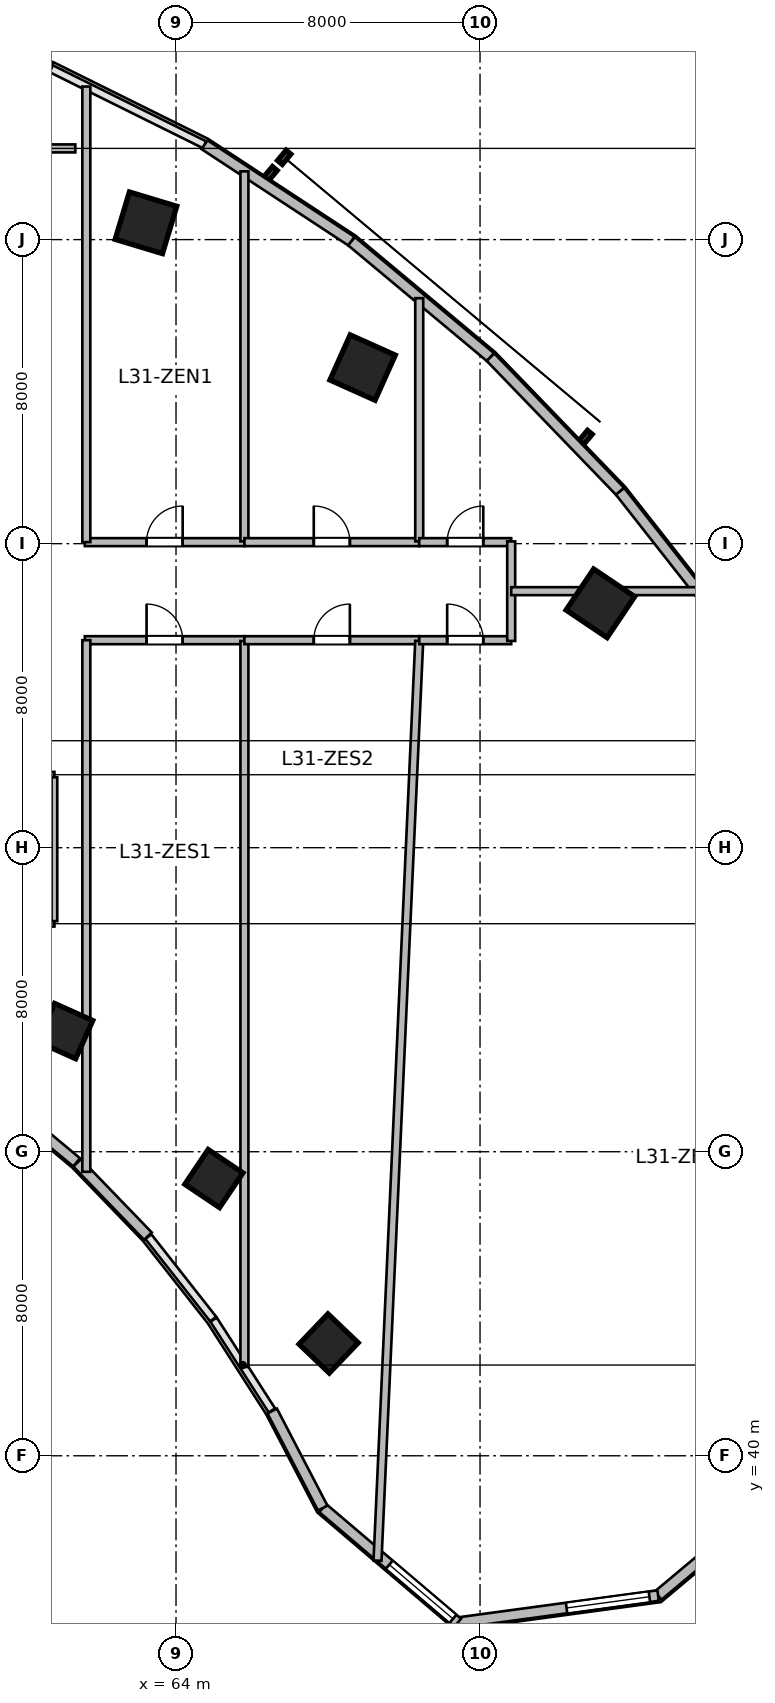
"""IFC4 building model, lengths in metres.
Left out: names, types, materials, properties, quantities, classifications, styles, units other than length and angle.
Written with IfcOpenShell. Run it as: python <this file> out.ifc"""

import sys

from ifc_helpers import new_model, si_unit, direction, frame, frame_2d, origin, origin_2d, place, context, subcontext, project, spatial, rectangle, extrude, source, transform, mapped, element, fill, save


model = new_model("IFC4")
c1 = context("Model", 3, precision=1e-05, world=origin(), true_north=direction((0.0, 1.0)))
c2 = subcontext(c1, "Body", "Model", "MODEL_VIEW")
j1 = project(units=[si_unit("LENGTHUNIT", "METRE"), si_unit("PLANEANGLEUNIT", "RADIAN")], contexts=[c1])
p1 = place(None, origin())
s1 = spatial("IfcSite", under=j1, at=p1, CompositionType="ELEMENT")
p2 = place(p1, origin())
s2 = spatial("IfcBuilding", under=s1, at=p2, CompositionType="ELEMENT")
p3 = place(p2, frame((0.0, 0.0, 131.1)))
s3 = spatial("IfcBuildingStorey", under=s2, at=p3, CompositionType="ELEMENT", Elevation=131.1)
m1 = source(origin(), c2, "Body", "SweptSolid", [
    extrude(rectangle(XDim=1.3, YDim=1.3, at=origin_2d()), origin(), (0.0, 0.0, 1.0), 3.9),
])
p4 = place(p3, frame((63.209, 72.442, 0.0), z_axis=(0.0, 0.0, 1.0), x_axis=(0.288697611798, 0.957420330337, 0.0)))
e1 = element("IfcColumn", 1, at=p4, inside=s3, PredefinedType="COLUMN", context=c2, shape_type="MappedRepresentation", body=[
    mapped(m1, transform((0.0, 0.0, 0.0), scale=1.0)),
])
m2 = source(origin(), c2, "Body", "SweptSolid", [
    extrude(rectangle(XDim=1.1, YDim=1.1, at=origin_2d()), origin(), (0.0, 0.0, 1.0), 3.9),
])
p5 = place(p3, frame((61.082, 51.175, 0.0), z_axis=(0.0, 0.0, 1.0), x_axis=(0.409126902895, 0.912477494148, 0.0)))
e2 = element("IfcColumn", 2, at=p5, inside=s3, PredefinedType="COLUMN", context=c2, shape_type="MappedRepresentation", body=[
    mapped(m2, transform((0.0, 0.0, 0.0), scale=1.0)),
])
p6 = place(p3, frame((68.91, 68.633, 0.0), z_axis=(0.0, 0.0, 1.0), x_axis=(0.409126902895, 0.912477494148, 0.0)))
e3 = element("IfcColumn", 3, at=p6, inside=s3, PredefinedType="COLUMN", context=c2, shape_type="MappedRepresentation", body=[
    mapped(m1, transform((0.0, 0.0, 0.0), scale=1.0)),
])
p7 = place(p3, frame((64.996, 47.294, 0.0), z_axis=(0.0, 0.0, 1.0), x_axis=(0.55774510898, 0.830012285095, 0.0)))
e4 = element("IfcColumn", 4, at=p7, inside=s3, PredefinedType="COLUMN", context=c2, shape_type="MappedRepresentation", body=[
    mapped(m2, transform((0.0, 0.0, 0.0), scale=1.0)),
])
p8 = place(p3, frame((75.167, 62.43, 0.0), z_axis=(0.0, 0.0, 1.0), x_axis=(0.55774510898, 0.830012285095, 0.0)))
e5 = element("IfcColumn", 5, at=p8, inside=s3, PredefinedType="COLUMN", context=c2, shape_type="MappedRepresentation", body=[
    mapped(m1, transform((0.0, 0.0, 0.0), scale=1.0)),
])
p9 = place(p3, frame((68.015, 42.955, 0.0), z_axis=(0.0, 0.0, 1.0), x_axis=(0.690756218984, 0.723087716626, 0.0)))
e6 = element("IfcColumn", 6, at=p9, inside=s3, PredefinedType="COLUMN", context=c2, shape_type="MappedRepresentation", body=[
    mapped(m2, transform((0.0, 0.0, 0.0), scale=1.0)),
])
m3 = source(origin(), c2, "Body", "SweptSolid", [
    extrude(rectangle(XDim=6.573, YDim=0.28, at=frame_2d((3.287, 0.0))), origin(), (0.0, 0.0, 1.0), 3.65),
])
p10 = place(p3, frame((81.725, 40.541, 0.0), z_axis=(0.0, 0.0, 1.0), x_axis=(-0.766715154163, -0.641987439423, 0.0)))
e7 = element("IfcWall", 7, at=p10, inside=s3, PredefinedType="SOLIDWALL", context=c2, shape_type="MappedRepresentation", body=[
    mapped(m3, transform((0.0, 0.0, 0.0), scale=1.0)),
])
p11 = place(p10, frame((0.543, 0.0, 0.95)))
e8 = element("IfcOpeningElement", 8, at=p11, cuts=e7, PredefinedType="OPENING", context=c2, shape_type="SweptSolid", body=[
    extrude(rectangle(XDim=2.2, YDim=2.1, at=frame_2d((1.1, 1.05))), frame((0.0, 0.15, 0.0), z_axis=(0.0, -1.0, 0.0), x_axis=(1.0, 0.0, 0.0)), (0.0, 0.0, 1.0), 0.3),
])
m4 = source(origin(), c2, "Body", "SweptSolid", [
    extrude(rectangle(XDim=5.324, YDim=0.28, at=frame_2d((2.662, 0.0))), origin(), (0.0, 0.0, 1.0), 3.65),
])
p12 = place(p3, frame((76.686, 36.322, 0.0), z_axis=(0.0, 0.0, 1.0), x_axis=(-0.990931467223, -0.134368252451, 0.0)))
e9 = element("IfcWall", 9, at=p12, inside=s3, PredefinedType="SOLIDWALL", context=c2, shape_type="MappedRepresentation", body=[
    mapped(m4, transform((0.0, 0.0, 0.0), scale=1.0)),
])
p13 = place(p12, frame((0.231, 0.0, 0.95)))
e10 = element("IfcOpeningElement", 10, at=p13, cuts=e9, PredefinedType="OPENING", context=c2, shape_type="SweptSolid", body=[
    extrude(rectangle(XDim=2.2, YDim=2.1, at=frame_2d((1.1, 1.05))), frame((0.0, 0.15, 0.0), z_axis=(0.0, -1.0, 0.0), x_axis=(1.0, 0.0, 0.0)), (0.0, 0.0, 1.0), 0.3),
])
m5 = source(origin(), c2, "Body", "SweptSolid", [
    extrude(rectangle(XDim=4.659, YDim=0.28, at=frame_2d((2.33, 0.0))), origin(), (0.0, 0.0, 1.0), 3.65),
])
p14 = place(p3, frame((71.41, 35.606, 0.0), z_axis=(0.0, 0.0, 1.0), x_axis=(-0.761913458795, 0.647678841176, 0.0)))
e11 = element("IfcWall", 11, at=p14, inside=s3, PredefinedType="SOLIDWALL", context=c2, shape_type="MappedRepresentation", body=[
    mapped(m5, transform((0.0, 0.0, 0.0), scale=1.0)),
])
p15 = place(p14, frame((0.16, 0.0, 0.95)))
e12 = element("IfcOpeningElement", 12, at=p15, cuts=e11, PredefinedType="OPENING", context=c2, shape_type="SweptSolid", body=[
    extrude(rectangle(XDim=2.2, YDim=2.1, at=frame_2d((1.1, 1.05))), frame((0.0, 0.15, 0.0), z_axis=(0.0, -1.0, 0.0), x_axis=(1.0, 0.0, 0.0)), (0.0, 0.0, 1.0), 0.3),
])
m6 = source(origin(), c2, "Body", "SweptSolid", [
    extrude(rectangle(XDim=2.88, YDim=0.28, at=frame_2d((1.44, 0.0))), origin(), (0.0, 0.0, 1.0), 3.65),
])
p16 = place(p3, frame((67.861, 38.624, 0.0), z_axis=(0.0, 0.0, 1.0), x_axis=(-0.461769086658, 0.887000175088, 0.0)))
e13 = element("IfcWall", 13, at=p16, inside=s3, PredefinedType="SOLIDWALL", context=c2, shape_type="MappedRepresentation", body=[
    mapped(m6, transform((0.0, 0.0, 0.0), scale=1.0)),
])
m7 = source(origin(), c2, "Body", "SweptSolid", [
    extrude(rectangle(XDim=2.68, YDim=0.28, at=frame_2d((1.34, 0.0))), origin(), (0.0, 0.0, 1.0), 3.65),
])
p17 = place(p3, frame((63.26, 45.78, 0.0), z_axis=(0.0, 0.0, 1.0), x_axis=(-0.694561996568, 0.719432855049, 0.0)))
e14 = element("IfcWall", 14, at=p17, inside=s3, PredefinedType="SOLIDWALL", context=c2, shape_type="MappedRepresentation", body=[
    mapped(m7, transform((0.0, 0.0, 0.0), scale=1.0)),
])
m8 = source(origin(), c2, "Body", "SweptSolid", [
    extrude(rectangle(XDim=2.601, YDim=0.28, at=frame_2d((1.3, 0.0))), origin(), (0.0, 0.0, 1.0), 3.65),
])
p18 = place(p3, frame((61.385, 47.721, 0.0), z_axis=(0.0, 0.0, 1.0), x_axis=(-0.76796730295, 0.640489048775, 0.0)))
e15 = element("IfcWall", 15, at=p18, inside=s3, PredefinedType="SOLIDWALL", context=c2, shape_type="MappedRepresentation", body=[
    mapped(m8, transform((0.0, 0.0, 0.0), scale=1.0)),
])
m9 = source(origin(), c2, "Body", "SweptSolid", [
    extrude(rectangle(XDim=4.409, YDim=0.28, at=frame_2d((2.205, 0.0))), origin(), (0.0, 0.0, 1.0), 3.65),
])
p19 = place(p3, frame((56.548, 77.941, 0.0), z_axis=(0.0, 0.0, 1.0), x_axis=(0.944879374121, -0.327418643881, 0.0)))
e16 = element("IfcWall", 16, at=p19, inside=s3, PredefinedType="SOLIDWALL", context=c2, shape_type="MappedRepresentation", body=[
    mapped(m9, transform((0.0, 0.0, 0.0), scale=1.0)),
])
m10 = source(origin(), c2, "Body", "SweptSolid", [
    extrude(rectangle(XDim=4.626, YDim=0.28, at=frame_2d((2.313, 0.0))), origin(), (0.0, 0.0, 1.0), 3.65),
])
p20 = place(p3, frame((64.751, 74.496, 0.0), z_axis=(0.0, 0.0, 1.0), x_axis=(0.83595938331, -0.548791316855, 0.0)))
e17 = element("IfcWall", 17, at=p20, inside=s3, PredefinedType="SOLIDWALL", context=c2, shape_type="MappedRepresentation", body=[
    mapped(m10, transform((0.0, 0.0, 0.0), scale=1.0)),
])
m11 = source(origin(), c2, "Body", "SweptSolid", [
    extrude(rectangle(XDim=4.762, YDim=0.28, at=frame_2d((2.381, 0.0))), origin(), (0.0, 0.0, 1.0), 3.65),
])
p21 = place(p3, frame((68.618, 71.958, 0.0), z_axis=(0.0, 0.0, 1.0), x_axis=(0.767952279762, -0.640507061638, 0.0)))
e18 = element("IfcWall", 18, at=p21, inside=s3, PredefinedType="SOLIDWALL", context=c2, shape_type="MappedRepresentation", body=[
    mapped(m11, transform((0.0, 0.0, 0.0), scale=1.0)),
])
m12 = source(origin(), c2, "Body", "SweptSolid", [
    extrude(rectangle(XDim=4.908, YDim=0.28, at=frame_2d((2.454, 0.0))), origin(), (0.0, 0.0, 1.0), 3.65),
])
p22 = place(p3, frame((72.275, 68.907, 0.0), z_axis=(0.0, 0.0, 1.0), x_axis=(0.694613154328, -0.719383462302, 0.0)))
e19 = element("IfcWall", 19, at=p22, inside=s3, PredefinedType="SOLIDWALL", context=c2, shape_type="MappedRepresentation", body=[
    mapped(m12, transform((0.0, 0.0, 0.0), scale=1.0)),
])
m13 = source(origin(), c2, "Body", "SweptSolid", [
    extrude(rectangle(XDim=5.058, YDim=0.28, at=frame_2d((2.529, 0.0))), origin(), (0.0, 0.0, 1.0), 3.65),
])
p23 = place(p3, frame((75.685, 65.376, 0.0), z_axis=(0.0, 0.0, 1.0), x_axis=(0.618145507434, -0.786063694391, 0.0)))
e20 = element("IfcWall", 20, at=p23, inside=s3, PredefinedType="SOLIDWALL", context=c2, shape_type="MappedRepresentation", body=[
    mapped(m13, transform((0.0, 0.0, 0.0), scale=1.0)),
])
m14 = source(origin(), c2, "Body", "SweptSolid", [
    extrude(rectangle(XDim=6.6, YDim=0.15, at=frame_2d((3.3, 0.0))), origin(), (0.0, 0.0, 1.0), 3.095),
])
p24 = place(p3, frame((54.2, 54.0, 0.0), z_axis=(0.0, 0.0, 1.0), x_axis=(1.0, 0.0, 0.0)))
e21 = element("IfcWall", 21, at=p24, inside=s3, PredefinedType="PARTITIONING", context=c2, shape_type="MappedRepresentation", body=[
    mapped(m14, transform((0.0, 0.0, 0.0), scale=1.0)),
])
m15 = source(origin(), c2, "Body", "SweptSolid", [
    extrude(rectangle(XDim=6.6, YDim=0.15, at=frame_2d((3.3, 0.0))), origin(), (0.0, 0.0, 1.0), 3.65),
])
p25 = place(p3, frame((54.2, 57.92, 0.0), z_axis=(0.0, 0.0, 1.0), x_axis=(1.0, 0.0, 0.0)))
e22 = element("IfcWall", 22, at=p25, inside=s3, PredefinedType="PARTITIONING", context=c2, shape_type="MappedRepresentation", body=[
    mapped(m15, transform((0.0, 0.0, 0.0), scale=1.0)),
])
p26 = place(p25, frame((2.825, 0.0, 0.0)))
e23 = element("IfcOpeningElement", 23, at=p26, cuts=e22, PredefinedType="OPENING", context=c2, shape_type="SweptSolid", body=[
    extrude(rectangle(XDim=0.95, YDim=2.1, at=frame_2d((0.475, 1.05))), frame((0.0, 0.085, 0.0), z_axis=(0.0, -1.0, 0.0), x_axis=(1.0, 0.0, 0.0)), (0.0, 0.0, 1.0), 0.17),
])
m16 = source(origin(), c2, "Body", "SweptSolid", [
    extrude(rectangle(XDim=3.785, YDim=0.15, at=frame_2d((1.893, 0.0))), origin(), (0.0, 0.0, 1.0), 3.65),
])
p27 = place(p3, frame((60.8, 54.067, 0.0), z_axis=(0.0, 0.0, 1.0), x_axis=(0.0, 1.0, 0.0)))
e24 = element("IfcWall", 24, at=p27, inside=s3, PredefinedType="PARTITIONING", context=c2, shape_type="MappedRepresentation", body=[
    mapped(m16, transform((0.0, 0.0, 0.0), scale=1.0)),
])
m17 = source(origin(), c2, "Body", "SweptSolid", [
    extrude(rectangle(XDim=26.7, YDim=0.21, at=frame_2d((13.35, 0.0))), origin(), (0.0, 0.0, 1.0), 3.022),
])
p28 = place(p3, frame((34.65, 74.4, 0.0), z_axis=(0.0, 0.0, 1.0), x_axis=(1.0, 0.0, 0.0)))
e25 = element("IfcWall", 25, at=p28, inside=s3, PredefinedType="PARTITIONING", context=c2, shape_type="MappedRepresentation", body=[
    mapped(m17, transform((0.0, 0.0, 0.0), scale=1.0)),
])
p29 = place(p28, frame((12.8, 0.0, 0.0)))
e26 = element("IfcOpeningElement", 26, at=p29, cuts=e25, PredefinedType="OPENING", context=c2, shape_type="SweptSolid", body=[
    extrude(rectangle(XDim=1.1, YDim=2.15, at=frame_2d((0.55, 1.075))), frame((0.0, 0.115, 0.0), z_axis=(0.0, -1.0, 0.0), x_axis=(1.0, 0.0, 0.0)), (0.0, 0.0, 1.0), 0.23),
])
m18 = source(origin(), c2, "Body", "SweptSolid", [
    extrude(rectangle(XDim=4.2, YDim=0.21, at=frame_2d((2.1, 0.0))), origin(), (0.0, 0.0, 1.0), 3.65),
])
p30 = place(p3, frame((61.6, 64.04, 0.0), z_axis=(0.0, 0.0, 1.0), x_axis=(1.0, 0.0, 0.0)))
e27 = element("IfcWall", 27, at=p30, inside=s3, PredefinedType="PARTITIONING", context=c2, shape_type="MappedRepresentation", body=[
    mapped(m18, transform((0.0, 0.0, 0.0), scale=1.0)),
])
p31 = place(p30, frame((1.625, 0.0, 0.0)))
e28 = element("IfcOpeningElement", 28, at=p31, cuts=e27, PredefinedType="OPENING", context=c2, shape_type="SweptSolid", body=[
    extrude(rectangle(XDim=0.95, YDim=2.1, at=frame_2d((0.475, 1.05))), frame((0.0, 0.115, 0.0), z_axis=(0.0, -1.0, 0.0), x_axis=(1.0, 0.0, 0.0)), (0.0, 0.0, 1.0), 0.23),
])
m19 = source(origin(), c2, "Body", "SweptSolid", [
    extrude(rectangle(XDim=9.736, YDim=0.21, at=frame_2d((4.868, 0.0))), origin(), (0.0, 0.0, 1.0), 3.65),
])
p32 = place(p3, frame((65.8, 64.06, 0.0), z_axis=(0.0, 0.0, 1.0), x_axis=(0.0, 1.0, 0.0)))
e29 = element("IfcWall", 29, at=p32, inside=s3, PredefinedType="PARTITIONING", context=c2, shape_type="MappedRepresentation", body=[
    mapped(m19, transform((0.0, 0.0, 0.0), scale=1.0)),
])
m20 = source(origin(), c2, "Body", "SweptSolid", [
    extrude(rectangle(XDim=4.6, YDim=0.21, at=frame_2d((2.3, 0.0))), origin(), (0.0, 0.0, 1.0), 3.65),
])
p33 = place(p3, frame((65.8, 64.04, 0.0), z_axis=(0.0, 0.0, 1.0), x_axis=(1.0, 0.0, 0.0)))
e30 = element("IfcWall", 30, at=p33, inside=s3, PredefinedType="PARTITIONING", context=c2, shape_type="MappedRepresentation", body=[
    mapped(m20, transform((0.0, 0.0, 0.0), scale=1.0)),
])
p34 = place(p33, frame((1.825, 0.0, 0.0)))
e31 = element("IfcOpeningElement", 31, at=p34, cuts=e30, PredefinedType="OPENING", context=c2, shape_type="SweptSolid", body=[
    extrude(rectangle(XDim=0.95, YDim=2.1, at=frame_2d((0.475, 1.05))), frame((0.0, 0.115, 0.0), z_axis=(0.0, -1.0, 0.0), x_axis=(1.0, 0.0, 0.0)), (0.0, 0.0, 1.0), 0.23),
])
m21 = source(origin(), c2, "Body", "SweptSolid", [
    extrude(rectangle(XDim=6.398, YDim=0.21, at=frame_2d((3.199, 0.0))), origin(), (0.0, 0.0, 1.0), 3.65),
])
p35 = place(p3, frame((70.4, 64.06, 0.0), z_axis=(0.0, 0.0, 1.0), x_axis=(0.0, 1.0, 0.0)))
e32 = element("IfcWall", 32, at=p35, inside=s3, PredefinedType="PARTITIONING", context=c2, shape_type="MappedRepresentation", body=[
    mapped(m21, transform((0.0, 0.0, 0.0), scale=1.0)),
])
m22 = source(origin(), c2, "Body", "SweptSolid", [
    extrude(rectangle(XDim=2.42, YDim=0.21, at=frame_2d((1.21, 0.0))), origin(), (0.0, 0.0, 1.0), 3.65),
])
p36 = place(p3, frame((70.4, 64.04, 0.0), z_axis=(0.0, 0.0, 1.0), x_axis=(1.0, 0.0, 0.0)))
e33 = element("IfcWall", 33, at=p36, inside=s3, PredefinedType="PARTITIONING", context=c2, shape_type="MappedRepresentation", body=[
    mapped(m22, transform((0.0, 0.0, 0.0), scale=1.0)),
])
p37 = place(p36, frame((0.735, 0.0, 0.0)))
e34 = element("IfcOpeningElement", 34, at=p37, cuts=e33, PredefinedType="OPENING", context=c2, shape_type="SweptSolid", body=[
    extrude(rectangle(XDim=0.95, YDim=2.1, at=frame_2d((0.475, 1.05))), frame((0.0, 0.115, 0.0), z_axis=(0.0, -1.0, 0.0), x_axis=(1.0, 0.0, 0.0)), (0.0, 0.0, 1.0), 0.23),
])
p38 = place(p3, frame((61.6, 61.46, 0.0), z_axis=(0.0, 0.0, 1.0), x_axis=(1.0, 0.0, 0.0)))
e35 = element("IfcWall", 35, at=p38, inside=s3, PredefinedType="PARTITIONING", context=c2, shape_type="MappedRepresentation", body=[
    mapped(m18, transform((0.0, 0.0, 0.0), scale=1.0)),
])
p39 = place(p38, frame((1.625, 0.0, 0.0)))
e36 = element("IfcOpeningElement", 36, at=p39, cuts=e35, PredefinedType="OPENING", context=c2, shape_type="SweptSolid", body=[
    extrude(rectangle(XDim=0.95, YDim=2.1, at=frame_2d((0.475, 1.05))), frame((0.0, 0.115, 0.0), z_axis=(0.0, -1.0, 0.0), x_axis=(1.0, 0.0, 0.0)), (0.0, 0.0, 1.0), 0.23),
])
m23 = source(origin(), c2, "Body", "SweptSolid", [
    extrude(rectangle(XDim=19.103, YDim=0.21, at=frame_2d((9.552, 0.0))), origin(), (0.0, 0.0, 1.0), 2.942),
])
p40 = place(p3, frame((65.8, 42.337, 0.0), z_axis=(0.0, 0.0, 1.0), x_axis=(0.0, 1.0, 0.0)))
e37 = element("IfcWall", 37, at=p40, inside=s3, PredefinedType="PARTITIONING", context=c2, shape_type="MappedRepresentation", body=[
    mapped(m23, transform((0.0, 0.0, 0.0), scale=1.0)),
])
p41 = place(p3, frame((65.8, 61.46, 0.0), z_axis=(0.0, 0.0, 1.0), x_axis=(1.0, 0.0, 0.0)))
e38 = element("IfcWall", 38, at=p41, inside=s3, PredefinedType="PARTITIONING", context=c2, shape_type="MappedRepresentation", body=[
    mapped(m20, transform((0.0, 0.0, 0.0), scale=1.0)),
])
p42 = place(p41, frame((1.825, 0.0, 0.0)))
e39 = element("IfcOpeningElement", 39, at=p42, cuts=e38, PredefinedType="OPENING", context=c2, shape_type="SweptSolid", body=[
    extrude(rectangle(XDim=0.95, YDim=2.1, at=frame_2d((0.475, 1.05))), frame((0.0, 0.115, 0.0), z_axis=(0.0, -1.0, 0.0), x_axis=(1.0, 0.0, 0.0)), (0.0, 0.0, 1.0), 0.23),
])
m24 = source(origin(), c2, "Body", "SweptSolid", [
    extrude(rectangle(XDim=24.224, YDim=0.21, at=frame_2d((12.112, 0.0))), origin(), (0.0, 0.0, 1.0), 2.942),
])
p43 = place(p3, frame((69.302, 37.241, 0.0), z_axis=(0.0, 0.0, 1.0), x_axis=(0.045312570313, 0.998972857975, 0.0)))
e40 = element("IfcWall", 40, at=p43, inside=s3, PredefinedType="PARTITIONING", context=c2, shape_type="MappedRepresentation", body=[
    mapped(m24, transform((0.0, 0.0, 0.0), scale=1.0)),
])
p44 = place(p3, frame((70.4, 61.46, 0.0), z_axis=(0.0, 0.0, 1.0), x_axis=(1.0, 0.0, 0.0)))
e41 = element("IfcWall", 41, at=p44, inside=s3, PredefinedType="PARTITIONING", context=c2, shape_type="MappedRepresentation", body=[
    mapped(m22, transform((0.0, 0.0, 0.0), scale=1.0)),
])
p45 = place(p44, frame((0.735, 0.0, 0.0)))
e42 = element("IfcOpeningElement", 42, at=p45, cuts=e41, PredefinedType="OPENING", context=c2, shape_type="SweptSolid", body=[
    extrude(rectangle(XDim=0.95, YDim=2.1, at=frame_2d((0.475, 1.05))), frame((0.0, 0.115, 0.0), z_axis=(0.0, -1.0, 0.0), x_axis=(1.0, 0.0, 0.0)), (0.0, 0.0, 1.0), 0.23),
])
m25 = source(origin(), c2, "Body", "SweptSolid", [
    extrude(rectangle(XDim=13.988, YDim=0.21, at=frame_2d((6.994, 0.0))), origin(), (0.0, 0.0, 1.0), 2.942),
])
p46 = place(p3, frame((61.64, 47.472, 0.0), z_axis=(0.0, 0.0, 1.0), x_axis=(0.0, 1.0, 0.0)))
e43 = element("IfcWall", 43, at=p46, inside=s3, PredefinedType="PARTITIONING", context=c2, shape_type="MappedRepresentation", body=[
    mapped(m25, transform((0.0, 0.0, 0.0), scale=1.0)),
])
m26 = source(origin(), c2, "Body", "SweptSolid", [
    extrude(rectangle(XDim=11.987, YDim=0.21, at=frame_2d((5.994, 0.0))), origin(), (0.0, 0.0, 1.0), 3.65),
])
p47 = place(p3, frame((61.64, 64.04, 0.0), z_axis=(0.0, 0.0, 1.0), x_axis=(0.0, 1.0, 0.0)))
e44 = element("IfcWall", 44, at=p47, inside=s3, PredefinedType="PARTITIONING", context=c2, shape_type="MappedRepresentation", body=[
    mapped(m26, transform((0.0, 0.0, 0.0), scale=1.0)),
])
m27 = source(origin(), c2, "Body", "SweptSolid", [
    extrude(rectangle(XDim=2.62, YDim=0.21, at=frame_2d((1.31, 0.0))), origin(), (0.0, 0.0, 1.0), 3.28),
])
p48 = place(p3, frame((72.82, 61.44, 0.0), z_axis=(0.0, 0.0, 1.0), x_axis=(0.0, 1.0, 0.0)))
e45 = element("IfcWall", 45, at=p48, inside=s3, PredefinedType="PARTITIONING", context=c2, shape_type="MappedRepresentation", body=[
    mapped(m27, transform((0.0, 0.0, 0.0), scale=1.0)),
])
m28 = source(origin(), c2, "Body", "SweptSolid", [
    extrude(rectangle(XDim=4.917, YDim=0.21, at=frame_2d((2.459, 0.0))), origin(), (0.0, 0.0, 1.0), 3.65),
])
p49 = place(p3, frame((72.82, 62.75, 0.0), z_axis=(0.0, 0.0, 1.0), x_axis=(1.0, 0.0, 0.0)))
e46 = element("IfcWall", 46, at=p49, inside=s3, PredefinedType="PARTITIONING", context=c2, shape_type="MappedRepresentation", body=[
    mapped(m28, transform((0.0, 0.0, 0.0), scale=1.0)),
])
m29 = source(origin(), c2, "Body", "SweptSolid", [
    extrude(rectangle(XDim=2.2, YDim=2.1, at=frame_2d((1.1, 1.05))), frame((0.0, 0.03, 0.0), z_axis=(0.0, -1.0, 0.0), x_axis=(1.0, 0.0, 0.0)), (0.0, 0.0, 1.0), 0.06),
])
p50 = place(p13, origin())
e47 = element("IfcWindow", 47, at=p50, inside=s3, PartitioningType="TRIPLE_PANEL_VERTICAL", PredefinedType="WINDOW", context=c2, shape_type="MappedRepresentation", body=[
    mapped(m29, transform((0.0, 0.0, 0.0), scale=1.0)),
])
fill(e10, e47)
p51 = place(p15, origin())
e48 = element("IfcWindow", 48, at=p51, inside=s3, PartitioningType="TRIPLE_PANEL_VERTICAL", PredefinedType="WINDOW", context=c2, shape_type="MappedRepresentation", body=[
    mapped(m29, transform((0.0, 0.0, 0.0), scale=1.0)),
])
fill(e12, e48)
m30 = source(origin(), c2, "Body", "SweptSolid", [
    extrude(rectangle(XDim=0.95, YDim=2.1, at=frame_2d((0.475, 1.05))), frame((0.0, 0.025, 0.0), z_axis=(0.0, -1.0, 0.0), x_axis=(1.0, 0.0, 0.0)), (0.0, 0.0, 1.0), 0.05),
])
p52 = place(p31, origin())
e49 = element("IfcDoor", 49, at=p52, inside=s3, OperationType="SINGLE_SWING_RIGHT", PredefinedType="DOOR", context=c2, shape_type="MappedRepresentation", body=[
    mapped(m30, transform((0.0, 0.0, 0.0), scale=1.0)),
])
fill(e28, e49)
p53 = place(p34, origin())
e50 = element("IfcDoor", 50, at=p53, inside=s3, OperationType="SINGLE_SWING_LEFT", PredefinedType="DOOR", context=c2, shape_type="MappedRepresentation", body=[
    mapped(m30, transform((0.0, 0.0, 0.0), scale=1.0)),
])
fill(e31, e50)
p54 = place(p37, origin())
e51 = element("IfcDoor", 51, at=p54, inside=s3, OperationType="SINGLE_SWING_RIGHT", PredefinedType="DOOR", context=c2, shape_type="MappedRepresentation", body=[
    mapped(m30, transform((0.0, 0.0, 0.0), scale=1.0)),
])
fill(e34, e51)
p55 = place(p39, origin())
e52 = element("IfcDoor", 52, at=p55, inside=s3, OperationType="SINGLE_SWING_LEFT", PredefinedType="DOOR", context=c2, shape_type="MappedRepresentation", body=[
    mapped(m30, transform((0.0, 0.0, 0.0), scale=1.0)),
])
fill(e36, e52)
p56 = place(p42, origin())
e53 = element("IfcDoor", 53, at=p56, inside=s3, OperationType="SINGLE_SWING_RIGHT", PredefinedType="DOOR", context=c2, shape_type="MappedRepresentation", body=[
    mapped(m30, transform((0.0, 0.0, 0.0), scale=1.0)),
])
fill(e39, e53)
p57 = place(p45, origin())
e54 = element("IfcDoor", 54, at=p57, inside=s3, OperationType="SINGLE_SWING_LEFT", PredefinedType="DOOR", context=c2, shape_type="MappedRepresentation", body=[
    mapped(m30, transform((0.0, 0.0, 0.0), scale=1.0)),
])
fill(e42, e54)
save(model, sys.argv[1])
